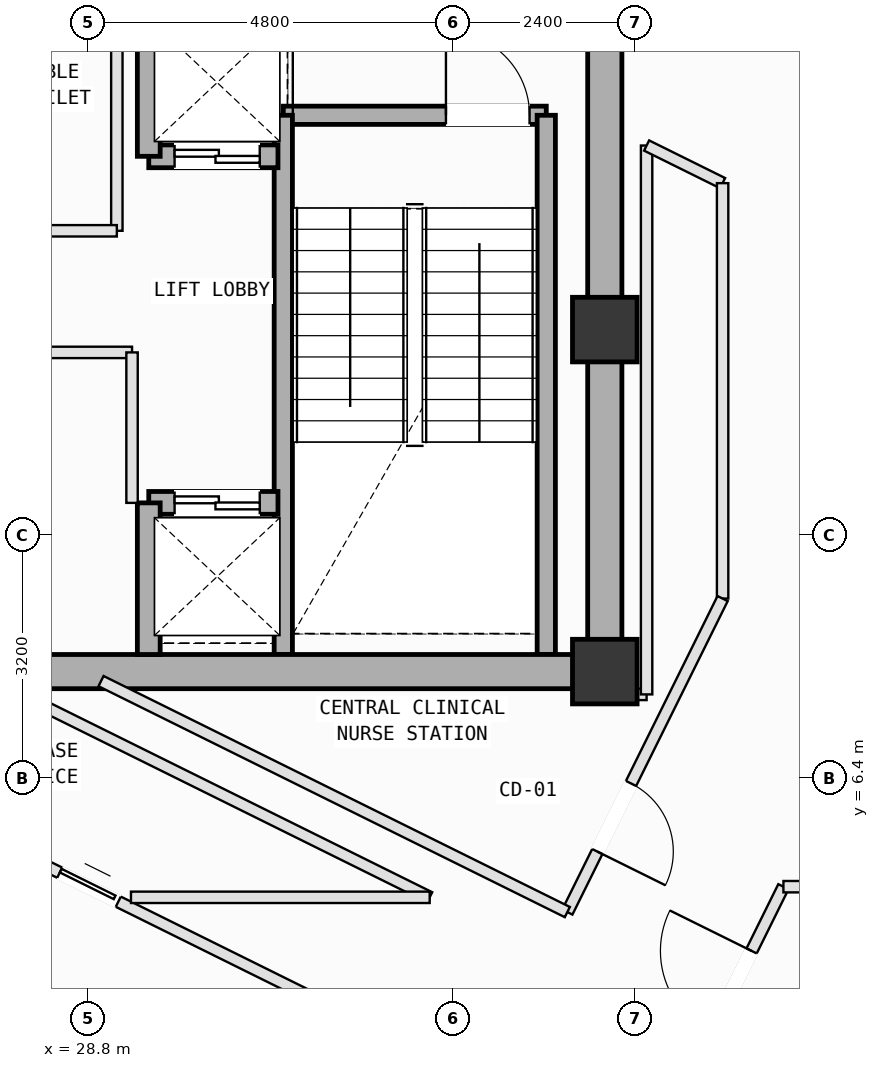
"""IFC4 building model, lengths in metres.
Left out: names, types, materials, properties, quantities, classifications, styles, units other than length and angle.
Written with IfcOpenShell. Run it as: python <this file> out.ifc"""

import sys

from ifc_helpers import new_model, si_unit, direction, frame, frame_2d, origin, origin_2d, place, context, subcontext, project, spatial, rectangle, extrude, element, fill, save


model = new_model("IFC4")
c1 = context("Model", 3, precision=1e-05, world=origin(), true_north=direction((0.0, 1.0)))
c2 = subcontext(c1, "Body", "Model", "MODEL_VIEW")
j1 = project(units=[si_unit("LENGTHUNIT", "METRE"), si_unit("PLANEANGLEUNIT", "RADIAN")], contexts=[c1])
p1 = place(None, origin())
s1 = spatial("IfcSite", under=j1, at=p1, CompositionType="ELEMENT")
p2 = place(p1, origin())
s2 = spatial("IfcBuilding", under=s1, at=p2, CompositionType="ELEMENT")
p3 = place(p2, frame((0.0, 0.0, 296.6)))
s3 = spatial("IfcBuildingStorey", under=s2, at=p3, CompositionType="ELEMENT", Elevation=296.6)
for number, where, z_axis, x_axis in (
    (1, (35.6, 7.8, 0.0), (0.0, 0.0, 1.0), (1.0, 0.0, 0.0)),
    (2, (35.6, 12.3, 0.0), (0.0, 0.0, 1.0), (1.0, 0.0, 0.0)),
):
    element("IfcColumn", number, at=place(p3, frame(where, z_axis=z_axis, x_axis=x_axis)), inside=s3, PredefinedType="COLUMN", context=c2, shape_type="SweptSolid", body=[
        extrude(rectangle(XDim=0.85, YDim=0.85, at=origin_2d()), origin(), (0.0, 0.0, 1.0), 4.0),
    ])
p4 = place(p3, frame((31.37, 15.12, 0.0), z_axis=(0.0, 0.0, 1.0), x_axis=(1.0, 0.0, 0.0)))
e3 = element("IfcWall", 3, at=p4, inside=s3, PredefinedType="SOLIDWALL", context=c2, shape_type="SweptSolid", body=[
    extrude(rectangle(XDim=3.46, YDim=0.24, at=frame_2d((1.73, 0.0))), origin(), (0.0, 0.0, 1.0), 3.78),
])
p5 = place(p4, frame((2.14, 0.0, 0.0)))
e4 = element("IfcOpeningElement", 4, at=p5, cuts=e3, PredefinedType="OPENING", context=c2, shape_type="SweptSolid", body=[
    extrude(rectangle(XDim=1.1, YDim=2.15, at=frame_2d((0.55, 1.075))), frame((0.0, 0.13, 0.0), z_axis=(0.0, -1.0, 0.0), x_axis=(1.0, 0.0, 0.0)), (0.0, 0.0, 1.0), 0.26),
])
for number, where, z_axis, x_axis in (
    (5, (34.83, 15.12, 0.0), (0.0, 0.0, 1.0), (0.0, -1.0, 0.0)),
    (6, (31.37, 8.025, 0.0), (0.0, 0.0, 1.0), (0.0, 1.0, 0.0)),
):
    element("IfcWall", number, at=place(p3, frame(where, z_axis=z_axis, x_axis=x_axis)), inside=s3, PredefinedType="SOLIDWALL", context=c2, shape_type="SweptSolid", body=[
        extrude(rectangle(XDim=7.095, YDim=0.24, at=frame_2d((3.548, 0.0))), origin(), (0.0, 0.0, 1.0), 3.78),
    ])
p6 = place(p3, frame((24.8, 7.8, 0.0), z_axis=(0.0, 0.0, 1.0), x_axis=(1.0, 0.0, 0.0)))
e7 = element("IfcWall", 7, at=p6, inside=s3, PredefinedType="SHEAR", context=c2, shape_type="SweptSolid", body=[
    extrude(rectangle(XDim=10.8, YDim=0.45, at=frame_2d((5.4, 0.0))), origin(), (0.0, 0.0, 1.0), 3.78),
])
p7 = place(p3, frame((35.6, 7.8, 0.0), z_axis=(0.0, 0.0, 1.0), x_axis=(0.0, 1.0, 0.0)))
e8 = element("IfcWall", 8, at=p7, inside=s3, PredefinedType="SHEAR", context=c2, shape_type="SweptSolid", body=[
    extrude(rectangle(XDim=9.0, YDim=0.45, at=frame_2d((4.5, 0.0))), origin(), (0.0, 0.0, 1.0), 3.78),
])
p8 = place(p3, frame((29.6, 10.02, 0.0), z_axis=(0.0, 0.0, 1.0), x_axis=(1.0, 0.0, 0.0)))
e9 = element("IfcWall", 9, at=p8, inside=s3, PredefinedType="SOLIDWALL", context=c2, shape_type="SweptSolid", body=[
    extrude(rectangle(XDim=1.7, YDim=0.3, at=frame_2d((0.85, 0.0))), origin(), (0.0, 0.0, 1.0), 3.78),
])
p9 = place(p8, frame((0.34, 0.0, 0.0)))
e10 = element("IfcOpeningElement", 10, at=p9, cuts=e9, PredefinedType="OPENING", context=c2, shape_type="SweptSolid", body=[
    extrude(rectangle(XDim=1.12, YDim=2.15, at=frame_2d((0.56, 1.075))), frame((0.0, 0.16, 0.0), z_axis=(0.0, -1.0, 0.0), x_axis=(1.0, 0.0, 0.0)), (0.0, 0.0, 1.0), 0.32),
])
p10 = place(p3, frame((29.6, 8.025, 0.0), z_axis=(0.0, 0.0, 1.0), x_axis=(0.0, 1.0, 0.0)))
e11 = element("IfcWall", 11, at=p10, inside=s3, PredefinedType="SOLIDWALL", context=c2, shape_type="SweptSolid", body=[
    extrude(rectangle(XDim=1.995, YDim=0.3, at=frame_2d((0.998, 0.0))), origin(), (0.0, 0.0, 1.0), 3.78),
])
p11 = place(p3, frame((29.6, 14.58, 0.0), z_axis=(0.0, 0.0, 1.0), x_axis=(1.0, 0.0, 0.0)))
e12 = element("IfcWall", 12, at=p11, inside=s3, PredefinedType="SOLIDWALL", context=c2, shape_type="SweptSolid", body=[
    extrude(rectangle(XDim=1.7, YDim=0.3, at=frame_2d((0.85, 0.0))), origin(), (0.0, 0.0, 1.0), 3.78),
])
p12 = place(p11, frame((0.34, 0.0, 0.0)))
e13 = element("IfcOpeningElement", 13, at=p12, cuts=e12, PredefinedType="OPENING", context=c2, shape_type="SweptSolid", body=[
    extrude(rectangle(XDim=1.12, YDim=2.15, at=frame_2d((0.56, 1.075))), frame((0.0, 0.16, 0.0), z_axis=(0.0, -1.0, 0.0), x_axis=(1.0, 0.0, 0.0)), (0.0, 0.0, 1.0), 0.32),
])
p13 = place(p3, frame((29.6, 14.58, 0.0), z_axis=(0.0, 0.0, 1.0), x_axis=(0.0, 1.0, 0.0)))
e14 = element("IfcWall", 14, at=p13, inside=s3, PredefinedType="SOLIDWALL", context=c2, shape_type="SweptSolid", body=[
    extrude(rectangle(XDim=2.22, YDim=0.3, at=frame_2d((1.11, 0.0))), origin(), (0.0, 0.0, 1.0), 3.78),
])
p14 = place(p3, frame((25.98, 12.0, 0.0), z_axis=(0.0, 0.0, 1.0), x_axis=(1.0, 0.0, 0.0)))
e15 = element("IfcWall", 15, at=p14, inside=s3, PredefinedType="PARTITIONING", context=c2, shape_type="SweptSolid", body=[
    extrude(rectangle(XDim=3.4, YDim=0.15, at=frame_2d((1.7, 0.0))), origin(), (0.0, 0.0, 1.0), 3.78),
])
p15 = place(p3, frame((29.38, 12.0, 0.0), z_axis=(0.0, 0.0, 1.0), x_axis=(0.0, -1.0, 0.0)))
e16 = element("IfcWall", 16, at=p15, inside=s3, PredefinedType="PARTITIONING", context=c2, shape_type="SweptSolid", body=[
    extrude(rectangle(XDim=1.98, YDim=0.15, at=frame_2d((0.99, 0.0))), origin(), (0.0, 0.0, 1.0), 3.78),
])
p16 = place(p3, frame((29.18, 17.42, 0.0), z_axis=(0.0, 0.0, 1.0), x_axis=(0.0, -1.0, 0.0)))
e17 = element("IfcWall", 17, at=p16, inside=s3, PredefinedType="PARTITIONING", context=c2, shape_type="SweptSolid", body=[
    extrude(rectangle(XDim=3.82, YDim=0.15, at=frame_2d((1.91, 0.0))), origin(), (0.0, 0.0, 1.0), 3.78),
])
p17 = place(p3, frame((29.18, 13.6, 0.0), z_axis=(0.0, 0.0, 1.0), x_axis=(-1.0, 0.0, 0.0)))
e18 = element("IfcWall", 18, at=p17, inside=s3, PredefinedType="PARTITIONING", context=c2, shape_type="SweptSolid", body=[
    extrude(rectangle(XDim=3.0, YDim=0.15, at=frame_2d((1.5, 0.0))), origin(), (0.0, 0.0, 1.0), 3.78),
])
p18 = place(p3, frame((36.581, 2.204, 0.0), z_axis=(0.0, 0.0, 1.0), x_axis=(0.443570825346, 0.896239322336, 0.0)))
e19 = element("IfcWall", 19, at=p18, inside=s3, PredefinedType="PARTITIONING", context=c2, shape_type="SweptSolid", body=[
    extrude(rectangle(XDim=3.086, YDim=0.15, at=frame_2d((1.543, 0.0))), origin(), (0.0, 0.0, 1.0), 3.78),
])
p19 = place(p18, frame((0.943, 0.0, 0.0)))
e20 = element("IfcOpeningElement", 20, at=p19, cuts=e19, PredefinedType="OPENING", context=c2, shape_type="SweptSolid", body=[
    extrude(rectangle(XDim=1.2, YDim=2.15, at=frame_2d((0.6, 1.075))), frame((0.0, 0.085, 0.0), z_axis=(0.0, -1.0, 0.0), x_axis=(1.0, 0.0, 0.0)), (0.0, 0.0, 1.0), 0.17),
])
p20 = place(p3, frame((37.95, 4.97, 0.0), z_axis=(0.0, 0.0, 1.0), x_axis=(1.0, 0.0, 0.0)))
e21 = element("IfcWall", 21, at=p20, inside=s3, PredefinedType="PARTITIONING", context=c2, shape_type="SweptSolid", body=[
    extrude(rectangle(XDim=1.903, YDim=0.15, at=frame_2d((0.952, 0.0))), origin(), (0.0, 0.0, 1.0), 3.78),
])
p21 = place(p3, frame((27.433, 5.647, 0.0), z_axis=(0.0, 0.0, 1.0), x_axis=(0.896133495003, -0.443784586409, 0.0)))
e22 = element("IfcWall", 22, at=p21, inside=s3, PredefinedType="PARTITIONING", context=c2, shape_type="SweptSolid", body=[
    extrude(rectangle(XDim=7.355, YDim=0.15, at=frame_2d((3.677, 0.0))), origin(), (0.0, 0.0, 1.0), 3.78),
])
p22 = place(p21, frame((1.111, 0.0, 0.0)))
e23 = element("IfcOpeningElement", 23, at=p22, cuts=e22, PredefinedType="OPENING", context=c2, shape_type="SweptSolid", body=[
    extrude(rectangle(XDim=0.86, YDim=2.06, at=frame_2d((0.43, 1.03))), frame((0.0, 0.085, 0.0), z_axis=(0.0, -1.0, 0.0), x_axis=(1.0, 0.0, 0.0)), (0.0, 0.0, 1.0), 0.17),
])
p23 = place(p3, frame((35.6, 7.5, 0.0), z_axis=(0.0, 0.0, 1.0), x_axis=(1.0, 0.0, 0.0)))
e24 = element("IfcWall", 24, at=p23, inside=s3, PredefinedType="PARTITIONING", context=c2, shape_type="SweptSolid", body=[
    extrude(rectangle(XDim=0.55, YDim=0.15, at=frame_2d((0.275, 0.0))), origin(), (0.0, 0.0, 1.0), 3.165),
])
p24 = place(p3, frame((36.15, 7.5, 0.0), z_axis=(0.0, 0.0, 1.0), x_axis=(0.0, 1.0, 0.0)))
e25 = element("IfcWall", 25, at=p24, inside=s3, PredefinedType="PARTITIONING", context=c2, shape_type="SweptSolid", body=[
    extrude(rectangle(XDim=7.222, YDim=0.15, at=frame_2d((3.611, 0.0))), origin(), (0.0, 0.0, 1.0), 3.78),
])
p25 = place(p3, frame((36.15, 14.722, 0.0), z_axis=(0.0, 0.0, 1.0), x_axis=(0.896257665166, -0.443533761546, 0.0)))
e26 = element("IfcWall", 26, at=p25, inside=s3, PredefinedType="PARTITIONING", context=c2, shape_type="SweptSolid", body=[
    extrude(rectangle(XDim=1.116, YDim=0.15, at=frame_2d((0.558, 0.0))), origin(), (0.0, 0.0, 1.0), 3.78),
])
p26 = place(p3, frame((37.15, 14.227, 0.0), z_axis=(0.0, 0.0, 1.0), x_axis=(0.0, -1.0, 0.0)))
e27 = element("IfcWall", 27, at=p26, inside=s3, PredefinedType="PARTITIONING", context=c2, shape_type="SweptSolid", body=[
    extrude(rectangle(XDim=5.466, YDim=0.15, at=frame_2d((2.733, 0.0))), origin(), (0.0, 0.0, 1.0), 3.78),
])
p27 = place(p3, frame((37.15, 8.761, 0.0), z_axis=(0.0, 0.0, 1.0), x_axis=(-0.443815988883, -0.896117943137, 0.0)))
e28 = element("IfcWall", 28, at=p27, inside=s3, PredefinedType="PARTITIONING", context=c2, shape_type="SweptSolid", body=[
    extrude(rectangle(XDim=4.603, YDim=0.15, at=frame_2d((2.302, 0.0))), origin(), (0.0, 0.0, 1.0), 3.78),
])
p28 = place(p27, frame((2.715, 0.0, 0.0)))
e29 = element("IfcOpeningElement", 29, at=p28, cuts=e28, PredefinedType="OPENING", context=c2, shape_type="SweptSolid", body=[
    extrude(rectangle(XDim=1.0, YDim=2.12, at=frame_2d((0.5, 1.06))), frame((0.0, 0.085, 0.0), z_axis=(0.0, -1.0, 0.0), x_axis=(1.0, 0.0, 0.0)), (0.0, 0.0, 1.0), 0.17),
])
p29 = place(p3, frame((35.107, 4.636, 0.0), z_axis=(0.0, 0.0, 1.0), x_axis=(-0.8960827402, 0.443887060767, 0.0)))
e30 = element("IfcWall", 30, at=p29, inside=s3, PredefinedType="PARTITIONING", context=c2, shape_type="SweptSolid", body=[
    extrude(rectangle(XDim=6.846, YDim=0.15, at=frame_2d((3.423, 0.0))), origin(), (0.0, 0.0, 1.0), 3.78),
])
p30 = place(p3, frame((27.553, 7.675, 0.0), z_axis=(0.0, 0.0, 1.0), x_axis=(0.896074338839, -0.443904020341, 0.0)))
e31 = element("IfcWall", 31, at=p30, inside=s3, PredefinedType="PARTITIONING", context=c2, shape_type="SweptSolid", body=[
    extrude(rectangle(XDim=6.409, YDim=0.15, at=frame_2d((3.205, 0.0))), origin(), (0.0, 0.0, 1.0), 3.78),
])
p31 = place(p3, frame((33.296, 4.83, 0.0), z_axis=(0.0, 0.0, 1.0), x_axis=(-1.0, 0.0, 0.0)))
e32 = element("IfcWall", 32, at=p31, inside=s3, PredefinedType="PARTITIONING", context=c2, shape_type="SweptSolid", body=[
    extrude(rectangle(XDim=3.93, YDim=0.15, at=frame_2d((1.965, 0.0))), origin(), (0.0, 0.0, 1.0), 3.78),
])
p32 = place(p5, origin())
e33 = element("IfcDoor", 33, at=p32, inside=s3, OperationType="SINGLE_SWING_LEFT", PredefinedType="DOOR", context=c2, shape_type="SweptSolid", body=[
    extrude(rectangle(XDim=1.1, YDim=2.15, at=frame_2d((0.55, 1.075))), frame((0.0, 0.025, 0.0), z_axis=(0.0, -1.0, 0.0), x_axis=(1.0, 0.0, 0.0)), (0.0, 0.0, 1.0), 0.05),
])
fill(e4, e33)
p33 = place(p9, origin())
e34 = element("IfcDoor", 34, at=p33, inside=s3, OperationType="DOUBLE_DOOR_SLIDING", PredefinedType="DOOR", context=c2, shape_type="SweptSolid", body=[
    extrude(rectangle(XDim=1.12, YDim=2.15, at=frame_2d((0.56, 1.075))), frame((0.0, 0.025, 0.0), z_axis=(0.0, -1.0, 0.0), x_axis=(1.0, 0.0, 0.0)), (0.0, 0.0, 1.0), 0.05),
])
fill(e10, e34)
p34 = place(p12, origin())
e35 = element("IfcDoor", 35, at=p34, inside=s3, OperationType="DOUBLE_DOOR_SLIDING", PredefinedType="DOOR", context=c2, shape_type="SweptSolid", body=[
    extrude(rectangle(XDim=1.12, YDim=2.15, at=frame_2d((0.56, 1.075))), frame((0.0, 0.025, 0.0), z_axis=(0.0, -1.0, 0.0), x_axis=(1.0, 0.0, 0.0)), (0.0, 0.0, 1.0), 0.05),
])
fill(e13, e35)
p35 = place(p19, origin())
e36 = element("IfcDoor", 36, at=p35, inside=s3, OperationType="SINGLE_SWING_RIGHT", PredefinedType="DOOR", context=c2, shape_type="SweptSolid", body=[
    extrude(rectangle(XDim=1.2, YDim=2.15, at=frame_2d((0.6, 1.075))), frame((0.0, 0.025, 0.0), z_axis=(0.0, -1.0, 0.0), x_axis=(1.0, 0.0, 0.0)), (0.0, 0.0, 1.0), 0.05),
])
fill(e20, e36)
p36 = place(p28, origin())
e37 = element("IfcDoor", 37, at=p36, inside=s3, OperationType="SINGLE_SWING_RIGHT", PredefinedType="DOOR", context=c2, shape_type="SweptSolid", body=[
    extrude(rectangle(XDim=1.0, YDim=2.12, at=frame_2d((0.5, 1.06))), frame((0.0, 0.025, 0.0), z_axis=(0.0, -1.0, 0.0), x_axis=(1.0, 0.0, 0.0)), (0.0, 0.0, 1.0), 0.05),
])
fill(e29, e37)
p37 = place(p22, origin())
e38 = element("IfcDoor", 38, at=p37, inside=s3, OperationType="SLIDING_TO_LEFT", PredefinedType="DOOR", context=c2, shape_type="SweptSolid", body=[
    extrude(rectangle(XDim=0.86, YDim=2.06, at=frame_2d((0.43, 1.03))), frame((0.0, 0.025, 0.0), z_axis=(0.0, -1.0, 0.0), x_axis=(1.0, 0.0, 0.0)), (0.0, 0.0, 1.0), 0.05),
])
fill(e23, e38)
save(model, sys.argv[1])
